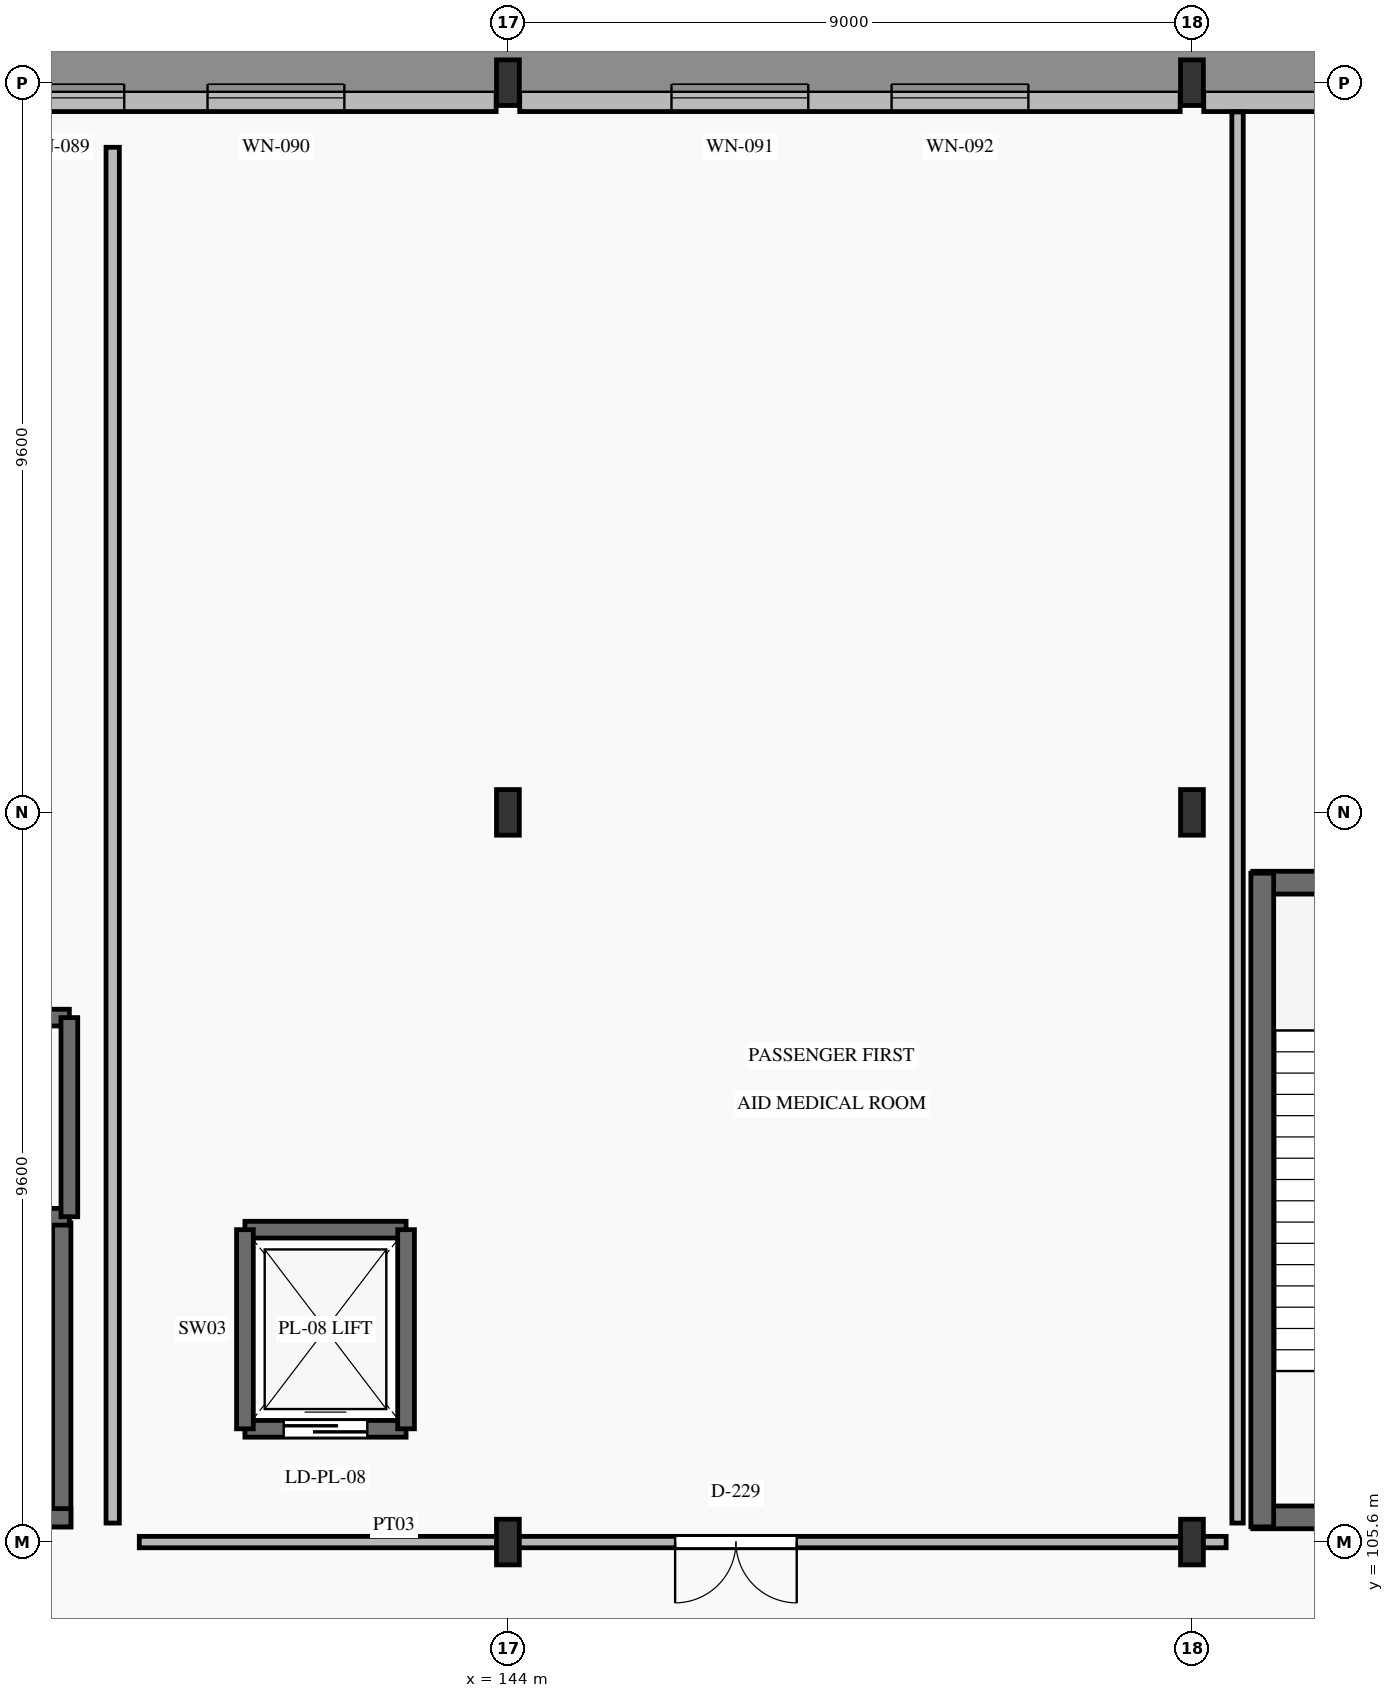
"""IFC4 building model, lengths in metres.
Left out: names, types, materials, properties, quantities, classifications, styles, units other than length and angle.
Written with IfcOpenShell. Run it as: python <this file> out.ifc"""

import sys

from ifc_helpers import new_model, si_unit, direction, frame, frame_2d, origin, origin_2d, place, context, subcontext, project, spatial, rectangle, i_section, extrude, element, fill, save


model = new_model("IFC4")
c1 = context("Model", 3, precision=1e-05, world=origin(), true_north=direction((0.0, 1.0)))
c2 = subcontext(c1, "Body", "Model", "MODEL_VIEW")
j1 = project(units=[si_unit("LENGTHUNIT", "METRE"), si_unit("PLANEANGLEUNIT", "RADIAN")], contexts=[c1])
p1 = place(None, origin())
s1 = spatial("IfcSite", under=j1, at=p1, CompositionType="ELEMENT")
p2 = place(p1, origin())
s2 = spatial("IfcBuilding", under=s1, at=p2, CompositionType="ELEMENT")
p3 = place(p2, origin())
s3 = spatial("IfcBuildingStorey", under=s2, at=p3, CompositionType="ELEMENT", Elevation=0.0)
for number, where, z_axis, x_axis in (
    (1, (144.0, 105.6, 0.0), (0.0, 0.0, 1.0), (1.0, 0.0, 0.0)),
    (2, (144.0, 115.2, 0.0), (0.0, 0.0, 1.0), (1.0, 0.0, 0.0)),
    (3, (144.0, 124.8, 0.0), (0.0, 0.0, 1.0), (1.0, 0.0, 0.0)),
    (4, (153.0, 105.6, 0.0), (0.0, 0.0, 1.0), (1.0, 0.0, 0.0)),
    (5, (153.0, 115.2, 0.0), (0.0, 0.0, 1.0), (1.0, 0.0, 0.0)),
    (6, (153.0, 124.8, 0.0), (0.0, 0.0, 1.0), (1.0, 0.0, 0.0)),
):
    element("IfcColumn", number, at=place(p3, frame(where, z_axis=z_axis, x_axis=x_axis)), inside=s3, PredefinedType="COLUMN", context=c2, shape_type="SweptSolid", body=[
        extrude(i_section(OverallWidth=0.3, OverallDepth=0.6, WebThickness=0.015, FlangeThickness=0.03, FilletRadius=0.027, at=origin_2d()), origin(), (0.0, 0.0, 1.0), 6.0),
    ])
p4 = place(p3, frame((135.155, 124.6, 0.0), z_axis=(0.0, 0.0, 1.0), x_axis=(1.0, 0.0, 0.0)))
e7 = element("IfcWall", 7, at=p4, inside=s3, PredefinedType="SOLIDWALL", context=c2, shape_type="SweptSolid", body=[
    extrude(rectangle(XDim=8.69, YDim=0.36, at=frame_2d((4.345, 0.0))), origin(), (0.0, 0.0, 1.0), 5.49),
])
p5 = place(p4, frame((1.997, 0.0, 0.95)))
e8 = element("IfcOpeningElement", 8, at=p5, cuts=e7, PredefinedType="OPENING", context=c2, shape_type="SweptSolid", body=[
    extrude(rectangle(XDim=1.8, YDim=2.8, at=frame_2d((0.9, 1.4))), frame((0.0, 0.195, 0.0), z_axis=(0.0, -1.0, 0.0), x_axis=(1.0, 0.0, 0.0)), (0.0, 0.0, 1.0), 0.39),
])
p6 = place(p4, frame((4.893, 0.0, 0.95)))
e9 = element("IfcOpeningElement", 9, at=p6, cuts=e7, PredefinedType="OPENING", context=c2, shape_type="SweptSolid", body=[
    extrude(rectangle(XDim=1.8, YDim=2.8, at=frame_2d((0.9, 1.4))), frame((0.0, 0.195, 0.0), z_axis=(0.0, -1.0, 0.0), x_axis=(1.0, 0.0, 0.0)), (0.0, 0.0, 1.0), 0.39),
])
p7 = place(p3, frame((144.155, 124.6, 0.0), z_axis=(0.0, 0.0, 1.0), x_axis=(1.0, 0.0, 0.0)))
e10 = element("IfcWall", 10, at=p7, inside=s3, PredefinedType="SOLIDWALL", context=c2, shape_type="SweptSolid", body=[
    extrude(rectangle(XDim=8.69, YDim=0.36, at=frame_2d((4.345, 0.0))), origin(), (0.0, 0.0, 1.0), 5.49),
])
p8 = place(p7, frame((1.997, 0.0, 0.95)))
e11 = element("IfcOpeningElement", 11, at=p8, cuts=e10, PredefinedType="OPENING", context=c2, shape_type="SweptSolid", body=[
    extrude(rectangle(XDim=1.8, YDim=2.8, at=frame_2d((0.9, 1.4))), frame((0.0, 0.195, 0.0), z_axis=(0.0, -1.0, 0.0), x_axis=(1.0, 0.0, 0.0)), (0.0, 0.0, 1.0), 0.39),
])
p9 = place(p7, frame((4.893, 0.0, 0.95)))
e12 = element("IfcOpeningElement", 12, at=p9, cuts=e10, PredefinedType="OPENING", context=c2, shape_type="SweptSolid", body=[
    extrude(rectangle(XDim=1.8, YDim=2.8, at=frame_2d((0.9, 1.4))), frame((0.0, 0.195, 0.0), z_axis=(0.0, -1.0, 0.0), x_axis=(1.0, 0.0, 0.0)), (0.0, 0.0, 1.0), 0.39),
])
p10 = place(p3, frame((153.155, 124.6, 0.0), z_axis=(0.0, 0.0, 1.0), x_axis=(1.0, 0.0, 0.0)))
e13 = element("IfcWall", 13, at=p10, inside=s3, PredefinedType="SOLIDWALL", context=c2, shape_type="SweptSolid", body=[
    extrude(rectangle(XDim=8.69, YDim=0.36, at=frame_2d((4.345, 0.0))), origin(), (0.0, 0.0, 1.0), 5.49),
])
p11 = place(p10, frame((1.997, 0.0, 0.95)))
e14 = element("IfcOpeningElement", 14, at=p11, cuts=e13, PredefinedType="OPENING", context=c2, shape_type="SweptSolid", body=[
    extrude(rectangle(XDim=1.8, YDim=2.8, at=frame_2d((0.9, 1.4))), frame((0.0, 0.195, 0.0), z_axis=(0.0, -1.0, 0.0), x_axis=(1.0, 0.0, 0.0)), (0.0, 0.0, 1.0), 0.39),
])
p12 = place(p10, frame((4.893, 0.0, 0.95)))
e15 = element("IfcOpeningElement", 15, at=p12, cuts=e13, PredefinedType="OPENING", context=c2, shape_type="SweptSolid", body=[
    extrude(rectangle(XDim=1.8, YDim=2.8, at=frame_2d((0.9, 1.4))), frame((0.0, 0.195, 0.0), z_axis=(0.0, -1.0, 0.0), x_axis=(1.0, 0.0, 0.0)), (0.0, 0.0, 1.0), 0.39),
])
p13 = place(p3, frame((138.13, 105.8, 0.0), z_axis=(0.0, 0.0, 1.0), x_axis=(0.0, 1.0, 0.0)))
e16 = element("IfcWall", 16, at=p13, inside=s3, PredefinedType="SHEAR", context=c2, shape_type="SweptSolid", body=[
    extrude(rectangle(XDim=4.0, YDim=0.24, at=frame_2d((2.0, 0.0))), origin(), (0.0, 0.0, 1.0), 6.0),
])
p14 = place(p3, frame((134.05, 105.92, 0.0), z_axis=(0.0, 0.0, 1.0), x_axis=(1.0, 0.0, 0.0)))
e17 = element("IfcWall", 17, at=p14, inside=s3, PredefinedType="SHEAR", context=c2, shape_type="SweptSolid", body=[
    extrude(rectangle(XDim=4.2, YDim=0.24, at=frame_2d((2.1, 0.0))), origin(), (0.0, 0.0, 1.0), 6.0),
])
p15 = place(p14, frame((1.4, 0.0, 0.0)))
e18 = element("IfcOpeningElement", 18, at=p15, cuts=e17, PredefinedType="OPENING", context=c2, shape_type="SweptSolid", body=[
    extrude(rectangle(XDim=1.4, YDim=2.2, at=frame_2d((0.7, 1.1))), frame((0.0, 0.135, 0.0), z_axis=(0.0, -1.0, 0.0), x_axis=(1.0, 0.0, 0.0)), (0.0, 0.0, 1.0), 0.27),
])
p16 = place(p3, frame((153.8, 105.925, 0.0), z_axis=(0.0, 0.0, 1.0), x_axis=(1.0, 0.0, 0.0)))
e19 = element("IfcWall", 19, at=p16, inside=s3, PredefinedType="SHEAR", context=c2, shape_type="SweptSolid", body=[
    extrude(rectangle(XDim=7.0, YDim=0.3, at=frame_2d((3.5, 0.0))), origin(), (0.0, 0.0, 1.0), 6.0),
])
p17 = place(p16, frame((1.25, 0.0, 0.0)))
e20 = element("IfcOpeningElement", 20, at=p17, cuts=e19, PredefinedType="OPENING", context=c2, shape_type="SweptSolid", body=[
    extrude(rectangle(XDim=1.35, YDim=2.2, at=frame_2d((0.675, 1.1))), frame((0.0, 0.165, 0.0), z_axis=(0.0, -1.0, 0.0), x_axis=(1.0, 0.0, 0.0)), (0.0, 0.0, 1.0), 0.33),
])
p18 = place(p3, frame((153.8, 114.275, 0.0), z_axis=(0.0, 0.0, 1.0), x_axis=(1.0, 0.0, 0.0)))
e21 = element("IfcWall", 21, at=p18, inside=s3, PredefinedType="SHEAR", context=c2, shape_type="SweptSolid", body=[
    extrude(rectangle(XDim=7.0, YDim=0.3, at=frame_2d((3.5, 0.0))), origin(), (0.0, 0.0, 1.0), 6.0),
])
p19 = place(p3, frame((153.925, 105.8, 0.0), z_axis=(0.0, 0.0, 1.0), x_axis=(0.0, 1.0, 0.0)))
e22 = element("IfcWall", 22, at=p19, inside=s3, PredefinedType="SHEAR", context=c2, shape_type="SweptSolid", body=[
    extrude(rectangle(XDim=8.6, YDim=0.3, at=frame_2d((4.3, 0.0))), origin(), (0.0, 0.0, 1.0), 6.0),
])
p20 = place(p3, frame((140.54, 107.09, 0.0), z_axis=(0.0, 0.0, 1.0), x_axis=(1.0, 0.0, 0.0)))
e23 = element("IfcWall", 23, at=p20, inside=s3, PredefinedType="SHEAR", context=c2, shape_type="SweptSolid", body=[
    extrude(rectangle(XDim=2.12, YDim=0.22, at=frame_2d((1.06, 0.0))), origin(), (0.0, 0.0, 1.0), 6.0),
])
p21 = place(p20, frame((0.51, 0.0, 0.0)))
e24 = element("IfcOpeningElement", 24, at=p21, cuts=e23, PredefinedType="OPENING", context=c2, shape_type="SweptSolid", body=[
    extrude(rectangle(XDim=1.1, YDim=2.15, at=frame_2d((0.55, 1.075))), frame((0.0, 0.125, 0.0), z_axis=(0.0, -1.0, 0.0), x_axis=(1.0, 0.0, 0.0)), (0.0, 0.0, 1.0), 0.25),
])
p22 = place(p3, frame((140.54, 109.71, 0.0), z_axis=(0.0, 0.0, 1.0), x_axis=(1.0, 0.0, 0.0)))
e25 = element("IfcWall", 25, at=p22, inside=s3, PredefinedType="SHEAR", context=c2, shape_type="SweptSolid", body=[
    extrude(rectangle(XDim=2.12, YDim=0.22, at=frame_2d((1.06, 0.0))), origin(), (0.0, 0.0, 1.0), 6.0),
])
for number, where, z_axis, x_axis in (
    (26, (140.54, 107.09, 0.0), (0.0, 0.0, 1.0), (0.0, 1.0, 0.0)),
    (27, (142.66, 107.09, 0.0), (0.0, 0.0, 1.0), (0.0, 1.0, 0.0)),
):
    element("IfcWall", number, at=place(p3, frame(where, z_axis=z_axis, x_axis=x_axis)), inside=s3, PredefinedType="SHEAR", context=c2, shape_type="SweptSolid", body=[
        extrude(rectangle(XDim=2.62, YDim=0.22, at=frame_2d((1.31, 0.0))), origin(), (0.0, 0.0, 1.0), 6.0),
    ])
p23 = place(p3, frame((134.07, 109.88, 0.0), z_axis=(0.0, 0.0, 1.0), x_axis=(1.0, 0.0, 0.0)))
e28 = element("IfcWall", 28, at=p23, inside=s3, PredefinedType="SHEAR", context=c2, shape_type="SweptSolid", body=[
    extrude(rectangle(XDim=4.16, YDim=0.22, at=frame_2d((2.08, 0.0))), origin(), (0.0, 0.0, 1.0), 6.0),
])
p24 = place(p23, frame((1.53, 0.0, 0.0)))
e29 = element("IfcOpeningElement", 29, at=p24, cuts=e28, PredefinedType="OPENING", context=c2, shape_type="SweptSolid", body=[
    extrude(rectangle(XDim=1.1, YDim=2.15, at=frame_2d((0.55, 1.075))), frame((0.0, 0.125, 0.0), z_axis=(0.0, -1.0, 0.0), x_axis=(1.0, 0.0, 0.0)), (0.0, 0.0, 1.0), 0.25),
])
p25 = place(p3, frame((134.07, 112.5, 0.0), z_axis=(0.0, 0.0, 1.0), x_axis=(1.0, 0.0, 0.0)))
e30 = element("IfcWall", 30, at=p25, inside=s3, PredefinedType="SHEAR", context=c2, shape_type="SweptSolid", body=[
    extrude(rectangle(XDim=4.16, YDim=0.22, at=frame_2d((2.08, 0.0))), origin(), (0.0, 0.0, 1.0), 6.0),
])
p26 = place(p3, frame((138.23, 109.88, 0.0), z_axis=(0.0, 0.0, 1.0), x_axis=(0.0, 1.0, 0.0)))
e31 = element("IfcWall", 31, at=p26, inside=s3, PredefinedType="SHEAR", context=c2, shape_type="SweptSolid", body=[
    extrude(rectangle(XDim=2.62, YDim=0.22, at=frame_2d((1.31, 0.0))), origin(), (0.0, 0.0, 1.0), 6.0),
])
p27 = place(p3, frame((139.15, 105.6, 0.0), z_axis=(0.0, 0.0, 1.0), x_axis=(1.0, 0.0, 0.0)))
e32 = element("IfcWall", 32, at=p27, inside=s3, PredefinedType="PARTITIONING", context=c2, shape_type="SweptSolid", body=[
    extrude(rectangle(XDim=14.3, YDim=0.15, at=frame_2d((7.15, 0.0))), origin(), (0.0, 0.0, 1.0), 5.37),
])
p28 = place(p27, frame((7.05, 0.0, 0.0)))
e33 = element("IfcOpeningElement", 33, at=p28, cuts=e32, PredefinedType="OPENING", context=c2, shape_type="SweptSolid", body=[
    extrude(rectangle(XDim=1.6, YDim=2.25, at=frame_2d((0.8, 1.125))), frame((0.0, 0.09, 0.0), z_axis=(0.0, -1.0, 0.0), x_axis=(1.0, 0.0, 0.0)), (0.0, 0.0, 1.0), 0.18),
])
p29 = place(p3, frame((153.6, 105.85, 0.0), z_axis=(0.0, 0.0, 1.0), x_axis=(0.0, 1.0, 0.0)))
e34 = element("IfcWall", 34, at=p29, inside=s3, PredefinedType="PARTITIONING", context=c2, shape_type="SweptSolid", body=[
    extrude(rectangle(XDim=18.565, YDim=0.15, at=frame_2d((9.282, 0.0))), origin(), (0.0, 0.0, 1.0), 5.72),
])
p30 = place(p3, frame((138.8, 105.85, 0.0), z_axis=(0.0, 0.0, 1.0), x_axis=(0.0, 1.0, 0.0)))
e35 = element("IfcWall", 35, at=p30, inside=s3, PredefinedType="PARTITIONING", context=c2, shape_type="SweptSolid", body=[
    extrude(rectangle(XDim=18.1, YDim=0.175, at=frame_2d((9.05, 0.0))), origin(), (0.0, 0.0, 1.0), 5.72),
])
p31 = place(p5, origin())
e36 = element("IfcWindow", 36, at=p31, inside=s3, PartitioningType="SINGLE_PANEL", PredefinedType="WINDOW", context=c2, shape_type="SweptSolid", body=[
    extrude(rectangle(XDim=1.8, YDim=2.8, at=frame_2d((0.9, 1.4))), frame((0.0, 0.03, 0.0), z_axis=(0.0, -1.0, 0.0), x_axis=(1.0, 0.0, 0.0)), (0.0, 0.0, 1.0), 0.06),
])
fill(e8, e36)
p32 = place(p6, origin())
e37 = element("IfcWindow", 37, at=p32, inside=s3, PartitioningType="SINGLE_PANEL", PredefinedType="WINDOW", context=c2, shape_type="SweptSolid", body=[
    extrude(rectangle(XDim=1.8, YDim=2.8, at=frame_2d((0.9, 1.4))), frame((0.0, 0.03, 0.0), z_axis=(0.0, -1.0, 0.0), x_axis=(1.0, 0.0, 0.0)), (0.0, 0.0, 1.0), 0.06),
])
fill(e9, e37)
p33 = place(p8, origin())
e38 = element("IfcWindow", 38, at=p33, inside=s3, PartitioningType="SINGLE_PANEL", PredefinedType="WINDOW", context=c2, shape_type="SweptSolid", body=[
    extrude(rectangle(XDim=1.8, YDim=2.8, at=frame_2d((0.9, 1.4))), frame((0.0, 0.03, 0.0), z_axis=(0.0, -1.0, 0.0), x_axis=(1.0, 0.0, 0.0)), (0.0, 0.0, 1.0), 0.06),
])
fill(e11, e38)
p34 = place(p9, origin())
e39 = element("IfcWindow", 39, at=p34, inside=s3, PartitioningType="SINGLE_PANEL", PredefinedType="WINDOW", context=c2, shape_type="SweptSolid", body=[
    extrude(rectangle(XDim=1.8, YDim=2.8, at=frame_2d((0.9, 1.4))), frame((0.0, 0.03, 0.0), z_axis=(0.0, -1.0, 0.0), x_axis=(1.0, 0.0, 0.0)), (0.0, 0.0, 1.0), 0.06),
])
fill(e12, e39)
p35 = place(p21, origin())
e40 = element("IfcDoor", 40, at=p35, inside=s3, OperationType="SLIDING_TO_LEFT", PredefinedType="DOOR", context=c2, shape_type="SweptSolid", body=[
    extrude(rectangle(XDim=1.1, YDim=2.15, at=frame_2d((0.55, 1.075))), frame((0.0, 0.025, 0.0), z_axis=(0.0, -1.0, 0.0), x_axis=(1.0, 0.0, 0.0)), (0.0, 0.0, 1.0), 0.05),
])
fill(e24, e40)
p36 = place(p28, frame((1.6, 0.0, 0.0), z_axis=(0.0, 0.0, 1.0), x_axis=(-1.0, 0.0, 0.0)))
e41 = element("IfcDoor", 41, at=p36, inside=s3, OperationType="DOUBLE_DOOR_SINGLE_SWING", PredefinedType="DOOR", context=c2, shape_type="SweptSolid", body=[
    extrude(rectangle(XDim=1.6, YDim=2.25, at=frame_2d((0.8, 1.125))), frame((0.0, 0.025, 0.0), z_axis=(0.0, -1.0, 0.0), x_axis=(1.0, 0.0, 0.0)), (0.0, 0.0, 1.0), 0.05),
])
fill(e33, e41)
save(model, sys.argv[1])
